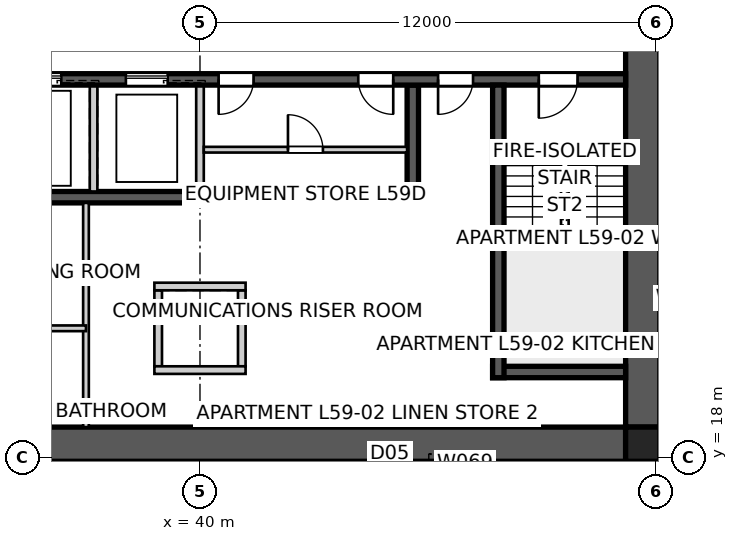
"""IFC4 building model, lengths in metres.
Left out: names, types, materials, properties, quantities, classifications, styles, units other than length and angle.
Written with IfcOpenShell. Run it as: python <this file> out.ifc"""

import sys

from ifc_helpers import new_model, si_unit, direction, frame, frame_2d, origin, origin_2d, place, context, subcontext, project, spatial, polyline, rectangle, outline, extrude, element, fill, save


model = new_model("IFC4")
c1 = context("Model", 3, precision=1e-05, world=origin(), true_north=direction((0.0, 1.0)))
c2 = subcontext(c1, "Body", "Model", "MODEL_VIEW")
j1 = project(units=[si_unit("LENGTHUNIT", "METRE"), si_unit("PLANEANGLEUNIT", "RADIAN")], contexts=[c1])
p1 = place(None, origin())
s1 = spatial("IfcSite", under=j1, at=p1, CompositionType="ELEMENT")
p2 = place(p1, origin())
s2 = spatial("IfcBuilding", under=s1, at=p2, CompositionType="ELEMENT")
p3 = place(p2, frame((0.0, 0.0, 215.0)))
s3 = spatial("IfcBuildingStorey", under=s2, at=p3, CompositionType="ELEMENT", Elevation=215.0)
p4 = place(p3, frame((51.2, 18.35, 0.0), z_axis=(0.0, 0.0, 1.0), x_axis=(-1.0, 0.0, 0.0)))
e1 = element("IfcWall", 1, at=p4, inside=s3, PredefinedType="SHEAR", context=c2, shape_type="SweptSolid", body=[
    extrude(outline(polyline([(0.0, -0.45), (22.4, -0.45), (22.4, -0.025), (22.85, -0.025), (22.85, 0.025), (22.4, 0.025), (22.4, 0.45), (0.0, 0.45), (0.0, 0.025), (-0.45, 0.025), (-0.45, -0.025), (0.0, -0.025), (0.0, -0.45)])), origin(), (0.0, 0.0, 1.0), 3.4),
])
p5 = place(p3, frame((51.65, 18.8, 0.0), z_axis=(0.0, 0.0, 1.0), x_axis=(0.0, 1.0, 0.0)))
e2 = element("IfcWall", 2, at=p5, inside=s3, PredefinedType="SHEAR", context=c2, shape_type="SweptSolid", body=[
    extrude(outline(polyline([(0.0, -0.45), (22.4, -0.45), (22.4, -0.025), (22.85, -0.025), (22.85, 0.025), (22.4, 0.025), (22.4, 0.45), (0.0, 0.45), (0.0, 0.025), (-0.45, 0.025), (-0.45, -0.025), (0.0, -0.025), (0.0, -0.45)])), origin(), (0.0, 0.0, 1.0), 3.4),
])
p6 = place(p5, frame((11.14, 0.0, 0.0)))
e3 = element("IfcOpeningElement", 3, at=p6, cuts=e2, PredefinedType="OPENING", context=c2, shape_type="SweptSolid", body=[
    extrude(rectangle(XDim=1.02, YDim=2.4, at=frame_2d((0.51, 1.2))), frame((0.0, 0.46, 0.0), z_axis=(0.0, -1.0, 0.0), x_axis=(1.0, 0.0, 0.0)), (0.0, 0.0, 1.0), 0.92),
])
p7 = place(p3, frame((51.2, 27.95, 0.0), z_axis=(0.0, 0.0, 1.0), x_axis=(-1.0, 0.0, 0.0)))
e4 = element("IfcWall", 4, at=p7, inside=s3, PredefinedType="SHEAR", context=c2, shape_type="SweptSolid", body=[
    extrude(rectangle(XDim=22.4, YDim=0.3, at=frame_2d((11.2, 0.0))), origin(), (0.0, 0.0, 1.0), 3.4),
])
p8 = place(p7, frame((19.04, 0.0, 0.0)))
e5 = element("IfcOpeningElement", 5, at=p8, cuts=e4, PredefinedType="OPENING", context=c2, shape_type="SweptSolid", body=[
    extrude(rectangle(XDim=0.92, YDim=2.1, at=frame_2d((0.46, 1.05))), frame((0.0, 0.16, 0.0), z_axis=(0.0, -1.0, 0.0), x_axis=(1.0, 0.0, 0.0)), (0.0, 0.0, 1.0), 0.32),
])
p9 = place(p7, frame((1.265, 0.0, 0.0)))
e6 = element("IfcOpeningElement", 6, at=p9, cuts=e4, PredefinedType="OPENING", context=c2, shape_type="SweptSolid", body=[
    extrude(rectangle(XDim=1.02, YDim=2.1, at=frame_2d((0.51, 1.05))), frame((0.0, 0.16, 0.0), z_axis=(0.0, -1.0, 0.0), x_axis=(1.0, 0.0, 0.0)), (0.0, 0.0, 1.0), 0.32),
])
p10 = place(p7, frame((4.015, 0.0, 0.0)))
e7 = element("IfcOpeningElement", 7, at=p10, cuts=e4, PredefinedType="OPENING", context=c2, shape_type="SweptSolid", body=[
    extrude(rectangle(XDim=0.92, YDim=2.1, at=frame_2d((0.46, 1.05))), frame((0.0, 0.16, 0.0), z_axis=(0.0, -1.0, 0.0), x_axis=(1.0, 0.0, 0.0)), (0.0, 0.0, 1.0), 0.32),
])
p11 = place(p7, frame((9.79, 0.0, 0.0)))
e8 = element("IfcOpeningElement", 8, at=p11, cuts=e4, PredefinedType="OPENING", context=c2, shape_type="SweptSolid", body=[
    extrude(rectangle(XDim=0.92, YDim=2.1, at=frame_2d((0.46, 1.05))), frame((0.0, 0.16, 0.0), z_axis=(0.0, -1.0, 0.0), x_axis=(1.0, 0.0, 0.0)), (0.0, 0.0, 1.0), 0.32),
])
p12 = place(p7, frame((6.115, 0.0, 0.0)))
e9 = element("IfcOpeningElement", 9, at=p12, cuts=e4, PredefinedType="OPENING", context=c2, shape_type="SweptSolid", body=[
    extrude(rectangle(XDim=0.92, YDim=2.1, at=frame_2d((0.46, 1.05))), frame((0.0, 0.16, 0.0), z_axis=(0.0, -1.0, 0.0), x_axis=(1.0, 0.0, 0.0)), (0.0, 0.0, 1.0), 0.32),
])
p13 = place(p7, frame((12.05, 0.0, 0.0)))
e10 = element("IfcOpeningElement", 10, at=p13, cuts=e4, PredefinedType="OPENING", context=c2, shape_type="SweptSolid", body=[
    extrude(rectangle(XDim=1.1, YDim=2.1, at=frame_2d((0.55, 1.05))), frame((0.0, 0.16, 0.0), z_axis=(0.0, -1.0, 0.0), x_axis=(1.0, 0.0, 0.0)), (0.0, 0.0, 1.0), 0.32),
])
p14 = place(p7, frame((14.85, 0.0, 0.0)))
e11 = element("IfcOpeningElement", 11, at=p14, cuts=e4, PredefinedType="OPENING", context=c2, shape_type="SweptSolid", body=[
    extrude(rectangle(XDim=1.1, YDim=2.1, at=frame_2d((0.55, 1.05))), frame((0.0, 0.16, 0.0), z_axis=(0.0, -1.0, 0.0), x_axis=(1.0, 0.0, 0.0)), (0.0, 0.0, 1.0), 0.32),
])
p15 = place(p3, frame((45.75, 24.85, 0.0), z_axis=(0.0, 0.0, 1.0), x_axis=(-1.0, 0.0, 0.0)))
e12 = element("IfcWall", 12, at=p15, inside=s3, PredefinedType="SHEAR", context=c2, shape_type="SweptSolid", body=[
    extrude(rectangle(XDim=11.5, YDim=0.3, at=frame_2d((5.75, 0.0))), origin(), (0.0, 0.0, 1.0), 3.4),
])
p16 = place(p3, frame((45.6, 27.8, 0.0), z_axis=(0.0, 0.0, 1.0), x_axis=(0.0, -1.0, 0.0)))
e13 = element("IfcWall", 13, at=p16, inside=s3, PredefinedType="SHEAR", context=c2, shape_type="SweptSolid", body=[
    extrude(rectangle(XDim=2.8, YDim=0.3, at=frame_2d((1.4, 0.0))), origin(), (0.0, 0.0, 1.0), 3.4),
])
for number, where, z_axis, x_axis in (
    (14, (40.0, 27.8, 0.0), (0.0, 0.0, 1.0), (0.0, -1.0, 0.0)),
    (15, (37.2, 27.8, 0.0), (0.0, 0.0, 1.0), (0.0, -1.0, 0.0)),
):
    element("IfcWall", number, at=place(p3, frame(where, z_axis=z_axis, x_axis=x_axis)), inside=s3, PredefinedType="SOLIDWALL", context=c2, shape_type="SweptSolid", body=[
        extrude(rectangle(XDim=2.8, YDim=0.2, at=frame_2d((1.4, 0.0))), origin(), (0.0, 0.0, 1.0), 3.4),
    ])
p17 = place(p3, frame((47.85, 27.8, 0.0), z_axis=(0.0, 0.0, 1.0), x_axis=(0.0, -1.0, 0.0)))
e16 = element("IfcWall", 16, at=p17, inside=s3, PredefinedType="SHEAR", context=c2, shape_type="SweptSolid", body=[
    extrude(rectangle(XDim=7.7, YDim=0.3, at=frame_2d((3.85, 0.0))), origin(), (0.0, 0.0, 1.0), 3.4),
])
p18 = place(p3, frame((51.2, 20.25, 0.0), z_axis=(0.0, 0.0, 1.0), x_axis=(-1.0, 0.0, 0.0)))
e17 = element("IfcWall", 17, at=p18, inside=s3, PredefinedType="SHEAR", context=c2, shape_type="SweptSolid", body=[
    extrude(rectangle(XDim=3.5, YDim=0.3, at=frame_2d((1.75, 0.0))), origin(), (0.0, 0.0, 1.0), 3.4),
])
for number, where, z_axis, x_axis in (
    (18, (38.9, 22.4, 0.0), (0.0, 0.0, 1.0), (0.0, -1.0, 0.0)),
    (19, (41.1, 22.4, 0.0), (0.0, 0.0, 1.0), (0.0, -1.0, 0.0)),
):
    element("IfcWall", number, at=place(p3, frame(where, z_axis=z_axis, x_axis=x_axis)), inside=s3, PredefinedType="SOLIDWALL", context=c2, shape_type="SweptSolid", body=[
        extrude(rectangle(XDim=2.0, YDim=0.2, at=frame_2d((1.0, 0.0))), origin(), (0.0, 0.0, 1.0), 3.4),
    ])
for number, where, z_axis, x_axis in (
    (20, (38.8, 22.5, 0.0), (0.0, 0.0, 1.0), (1.0, 0.0, 0.0)),
    (21, (38.8, 20.3, 0.0), (0.0, 0.0, 1.0), (1.0, 0.0, 0.0)),
):
    element("IfcWall", number, at=place(p3, frame(where, z_axis=z_axis, x_axis=x_axis)), inside=s3, PredefinedType="SOLIDWALL", context=c2, shape_type="SweptSolid", body=[
        extrude(rectangle(XDim=2.4, YDim=0.2, at=frame_2d((1.2, 0.0))), origin(), (0.0, 0.0, 1.0), 3.4),
    ])
p19 = place(p3, frame((51.65, 18.35, 0.0), z_axis=(0.0, 0.0, 1.0), x_axis=(1.0, 0.0, 0.0)))
e22 = element("IfcColumn", 22, at=p19, inside=s3, PredefinedType="COLUMN", context=c2, shape_type="SweptSolid", body=[
    extrude(rectangle(XDim=0.9, YDim=0.9, at=origin_2d()), origin(), (0.0, 0.0, 1.0), 3.4),
])
p20 = place(p3, frame((37.0, 18.8, 0.0), z_axis=(0.0, 0.0, 1.0), x_axis=(0.0, 1.0, 0.0)))
e23 = element("IfcWall", 23, at=p20, inside=s3, PredefinedType="SOLIDWALL", context=c2, shape_type="SweptSolid", body=[
    extrude(rectangle(XDim=5.9, YDim=0.15, at=frame_2d((2.95, 0.0))), origin(), (0.0, 0.0, 1.0), 3.25),
])
p21 = place(p3, frame((37.0, 21.4, 0.0), z_axis=(0.0, 0.0, 1.0), x_axis=(-1.0, 0.0, 0.0)))
e24 = element("IfcWall", 24, at=p21, inside=s3, PredefinedType="SOLIDWALL", context=c2, shape_type="SweptSolid", body=[
    extrude(rectangle(XDim=8.2, YDim=0.15, at=frame_2d((4.1, 0.0))), origin(), (0.0, 0.0, 1.0), 3.25),
])
p22 = place(p21, frame((3.64, 0.0, 0.0)))
e25 = element("IfcOpeningElement", 25, at=p22, cuts=e24, PredefinedType="OPENING", context=c2, shape_type="SweptSolid", body=[
    extrude(rectangle(XDim=0.92, YDim=2.1, at=frame_2d((0.46, 1.05))), frame((0.0, 0.085, 0.0), z_axis=(0.0, -1.0, 0.0), x_axis=(1.0, 0.0, 0.0)), (0.0, 0.0, 1.0), 0.17),
])
p23 = place(p3, frame((40.1, 26.1, 0.0), z_axis=(0.0, 0.0, 1.0), x_axis=(1.0, 0.0, 0.0)))
e26 = element("IfcWall", 26, at=p23, inside=s3, PredefinedType="SOLIDWALL", context=c2, shape_type="SweptSolid", body=[
    extrude(rectangle(XDim=5.35, YDim=0.15, at=frame_2d((2.675, 0.0))), origin(), (0.0, 0.0, 1.0), 3.25),
])
p24 = place(p23, frame((2.215, 0.0, 0.0)))
e27 = element("IfcOpeningElement", 27, at=p24, cuts=e26, PredefinedType="OPENING", context=c2, shape_type="SweptSolid", body=[
    extrude(rectangle(XDim=0.92, YDim=2.1, at=frame_2d((0.46, 1.05))), frame((0.0, 0.085, 0.0), z_axis=(0.0, -1.0, 0.0), x_axis=(1.0, 0.0, 0.0)), (0.0, 0.0, 1.0), 0.17),
])
p25 = place(p9, origin())
e28 = element("IfcDoor", 28, at=p25, inside=s3, OperationType="SINGLE_SWING_RIGHT", PredefinedType="DOOR", context=c2, shape_type="SweptSolid", body=[
    extrude(rectangle(XDim=1.02, YDim=2.1, at=frame_2d((0.51, 1.05))), frame((0.0, 0.025, 0.0), z_axis=(0.0, -1.0, 0.0), x_axis=(1.0, 0.0, 0.0)), (0.0, 0.0, 1.0), 0.05),
])
fill(e6, e28)
p26 = place(p10, origin())
e29 = element("IfcDoor", 29, at=p26, inside=s3, OperationType="SINGLE_SWING_RIGHT", PredefinedType="DOOR", context=c2, shape_type="SweptSolid", body=[
    extrude(rectangle(XDim=0.92, YDim=2.1, at=frame_2d((0.46, 1.05))), frame((0.0, 0.025, 0.0), z_axis=(0.0, -1.0, 0.0), x_axis=(1.0, 0.0, 0.0)), (0.0, 0.0, 1.0), 0.05),
])
fill(e7, e29)
p27 = place(p11, origin())
e30 = element("IfcDoor", 30, at=p27, inside=s3, OperationType="SINGLE_SWING_RIGHT", PredefinedType="DOOR", context=c2, shape_type="SweptSolid", body=[
    extrude(rectangle(XDim=0.92, YDim=2.1, at=frame_2d((0.46, 1.05))), frame((0.0, 0.025, 0.0), z_axis=(0.0, -1.0, 0.0), x_axis=(1.0, 0.0, 0.0)), (0.0, 0.0, 1.0), 0.05),
])
fill(e8, e30)
p28 = place(p12, origin())
e31 = element("IfcDoor", 31, at=p28, inside=s3, OperationType="SINGLE_SWING_LEFT", PredefinedType="DOOR", context=c2, shape_type="SweptSolid", body=[
    extrude(rectangle(XDim=0.92, YDim=2.1, at=frame_2d((0.46, 1.05))), frame((0.0, 0.025, 0.0), z_axis=(0.0, -1.0, 0.0), x_axis=(1.0, 0.0, 0.0)), (0.0, 0.0, 1.0), 0.05),
])
fill(e9, e31)
p29 = place(p24, origin())
e32 = element("IfcDoor", 32, at=p29, inside=s3, OperationType="SINGLE_SWING_LEFT", PredefinedType="DOOR", context=c2, shape_type="SweptSolid", body=[
    extrude(rectangle(XDim=0.92, YDim=2.1, at=frame_2d((0.46, 1.05))), frame((0.0, 0.025, 0.0), z_axis=(0.0, -1.0, 0.0), x_axis=(1.0, 0.0, 0.0)), (0.0, 0.0, 1.0), 0.05),
])
fill(e27, e32)
p30 = place(p13, origin())
e33 = element("IfcDoor", 33, at=p30, inside=s3, OperationType="SLIDING_TO_LEFT", PredefinedType="DOOR", context=c2, shape_type="SweptSolid", body=[
    extrude(rectangle(XDim=1.1, YDim=2.1, at=frame_2d((0.55, 1.05))), frame((0.0, 0.025, 0.0), z_axis=(0.0, -1.0, 0.0), x_axis=(1.0, 0.0, 0.0)), (0.0, 0.0, 1.0), 0.05),
])
fill(e10, e33)
p31 = place(p14, origin())
e34 = element("IfcDoor", 34, at=p31, inside=s3, OperationType="SLIDING_TO_LEFT", PredefinedType="DOOR", context=c2, shape_type="SweptSolid", body=[
    extrude(rectangle(XDim=1.1, YDim=2.1, at=frame_2d((0.55, 1.05))), frame((0.0, 0.025, 0.0), z_axis=(0.0, -1.0, 0.0), x_axis=(1.0, 0.0, 0.0)), (0.0, 0.0, 1.0), 0.05),
])
fill(e11, e34)
save(model, sys.argv[1])
